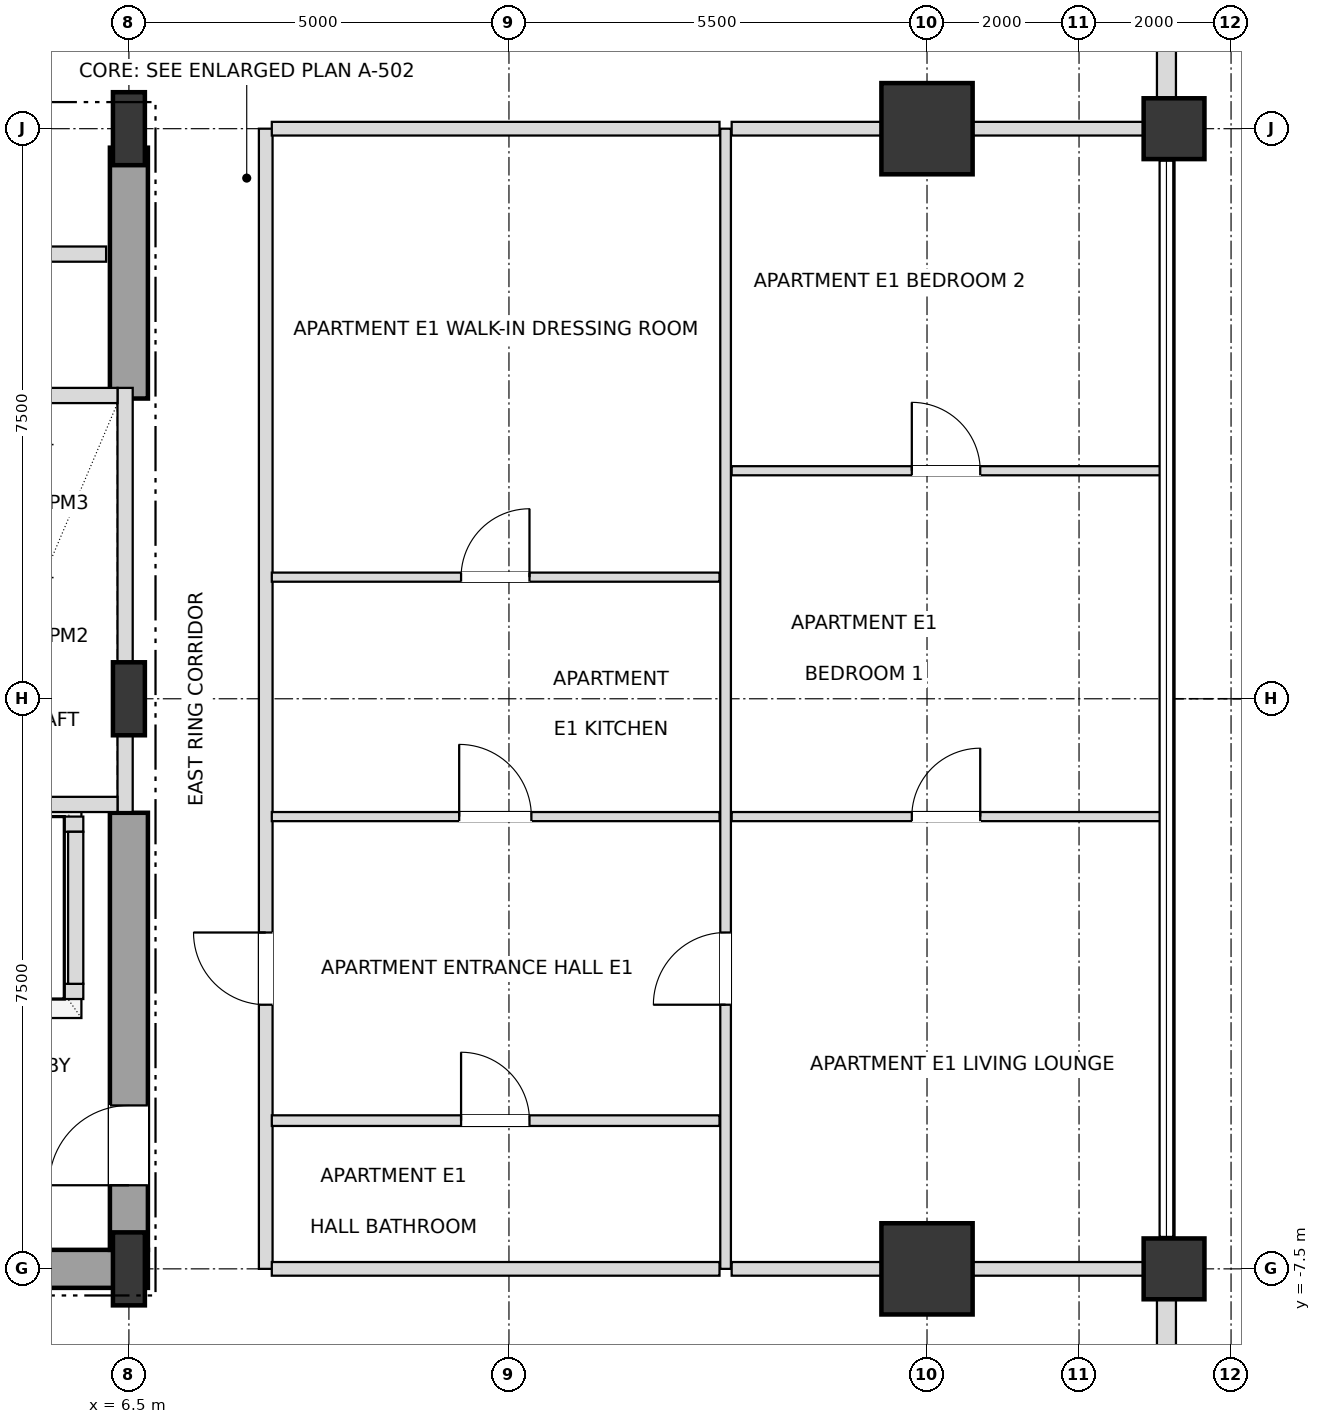
"""IFC4 building model, lengths in metres.
Left out: names, types, materials, properties, quantities, classifications, styles, units other than length and angle.
Written with IfcOpenShell. Run it as: python <this file> out.ifc"""

import sys

from ifc_helpers import new_model, si_unit, direction, frame, frame_2d, origin, origin_2d, place, context, subcontext, project, spatial, rectangle, i_section, extrude, element, fill, save


model = new_model("IFC4")
c1 = context("Model", 3, precision=1e-05, world=origin(), true_north=direction((0.0, 1.0)))
c2 = subcontext(c1, "Body", "Model", "MODEL_VIEW")
j1 = project(units=[si_unit("LENGTHUNIT", "METRE"), si_unit("PLANEANGLEUNIT", "RADIAN")], contexts=[c1])
p1 = place(None, origin())
s1 = spatial("IfcSite", under=j1, at=p1, CompositionType="ELEMENT")
p2 = place(p1, origin())
s2 = spatial("IfcBuilding", under=s1, at=p2, CompositionType="ELEMENT")
p3 = place(p2, frame((0.0, 0.0, 99.0)))
s3 = spatial("IfcBuildingStorey", under=s2, at=p3, CompositionType="ELEMENT", Elevation=99.0)
for number, where, z_axis, x_axis in (
    (1, (6.5, -7.5, 0.0), (0.0, 0.0, 1.0), (1.0, 0.0, 0.0)),
    (2, (6.5, 0.0, 0.0), (0.0, 0.0, 1.0), (1.0, 0.0, 0.0)),
    (3, (6.5, 7.5, 0.0), (0.0, 0.0, 1.0), (1.0, 0.0, 0.0)),
):
    element("IfcColumn", number, at=place(p3, frame(where, z_axis=z_axis, x_axis=x_axis)), inside=s3, PredefinedType="COLUMN", context=c2, shape_type="SweptSolid", body=[
        extrude(i_section(OverallWidth=0.42, OverallDepth=0.96, WebThickness=0.022, FlangeThickness=0.034, at=origin_2d()), origin(), (0.0, 0.0, 1.0), 3.6),
    ])
for number, where, z_axis, x_axis in (
    (4, (17.0, -7.5, 0.0), (0.0, 0.0, 1.0), (1.0, 0.0, 0.0)),
    (5, (17.0, 7.5, 0.0), (0.0, 0.0, 1.0), (1.0, 0.0, 0.0)),
):
    element("IfcColumn", number, at=place(p3, frame(where, z_axis=z_axis, x_axis=x_axis)), inside=s3, PredefinedType="USERDEFINED", context=c2, shape_type="SweptSolid", body=[
        extrude(rectangle(XDim=1.2, YDim=1.2, at=origin_2d()), origin(), (0.0, 0.0, 1.0), 3.6),
    ])
for number, where, z_axis, x_axis in (
    (6, (20.25, -7.5, 0.0), (0.0, 0.0, 1.0), (1.0, 0.0, 0.0)),
    (7, (20.25, 7.5, 0.0), (0.0, 0.0, 1.0), (1.0, 0.0, 0.0)),
):
    element("IfcColumn", number, at=place(p3, frame(where, z_axis=z_axis, x_axis=x_axis)), inside=s3, PredefinedType="COLUMN", context=c2, shape_type="SweptSolid", body=[
        extrude(rectangle(XDim=0.8, YDim=0.8, at=origin_2d()), origin(), (0.0, 0.0, 1.0), 3.6),
    ])
p4 = place(p3, frame((20.15, -12.605, 0.0), z_axis=(0.0, 0.0, 1.0), x_axis=(0.0, 1.0, 0.0)))
e8 = element("IfcWall", 8, at=p4, inside=s3, PredefinedType="SOLIDWALL", context=c2, shape_type="SweptSolid", body=[
    extrude(rectangle(XDim=4.71, YDim=0.25, at=frame_2d((2.355, 0.0))), origin(), (0.0, 0.0, 1.0), 2.736),
])
p5 = place(p4, frame((1.455, 0.0, 0.72)))
e9 = element("IfcOpeningElement", 9, at=p5, cuts=e8, PredefinedType="OPENING", context=c2, shape_type="SweptSolid", body=[
    extrude(rectangle(XDim=1.8, YDim=1.68, at=frame_2d((0.9, 0.84))), frame((0.0, 0.135, 0.0), z_axis=(0.0, -1.0, 0.0), x_axis=(1.0, 0.0, 0.0)), (0.0, 0.0, 1.0), 0.27),
])
p6 = place(p3, frame((20.15, 7.895, 0.0), z_axis=(0.0, 0.0, 1.0), x_axis=(0.0, 1.0, 0.0)))
e10 = element("IfcWall", 10, at=p6, inside=s3, PredefinedType="SOLIDWALL", context=c2, shape_type="SweptSolid", body=[
    extrude(rectangle(XDim=4.71, YDim=0.25, at=frame_2d((2.355, 0.0))), origin(), (0.0, 0.0, 1.0), 2.736),
])
p7 = place(p6, frame((1.455, 0.0, 0.72)))
e11 = element("IfcOpeningElement", 11, at=p7, cuts=e10, PredefinedType="OPENING", context=c2, shape_type="SweptSolid", body=[
    extrude(rectangle(XDim=1.8, YDim=1.68, at=frame_2d((0.9, 0.84))), frame((0.0, 0.135, 0.0), z_axis=(0.0, -1.0, 0.0), x_axis=(1.0, 0.0, 0.0)), (0.0, 0.0, 1.0), 0.27),
])
p8 = place(p3, frame((0.0, -7.5, 0.0), z_axis=(0.0, 0.0, 1.0), x_axis=(1.0, 0.0, 0.0)))
e12 = element("IfcWall", 12, at=p8, inside=s3, PredefinedType="SHEAR", context=c2, shape_type="SweptSolid", body=[
    extrude(rectangle(XDim=6.75, YDim=0.5, at=frame_2d((3.375, 0.0))), origin(), (0.0, 0.0, 1.0), 3.38),
])
p9 = place(p3, frame((6.5, -7.25, 0.0), z_axis=(0.0, 0.0, 1.0), x_axis=(0.0, 1.0, 0.0)))
e13 = element("IfcWall", 13, at=p9, inside=s3, PredefinedType="SHEAR", context=c2, shape_type="SweptSolid", body=[
    extrude(rectangle(XDim=5.75, YDim=0.5, at=frame_2d((2.875, 0.0))), origin(), (0.0, 0.0, 1.0), 3.38),
])
p10 = place(p9, frame((0.85, 0.0, 0.0)))
e14 = element("IfcOpeningElement", 14, at=p10, cuts=e13, PredefinedType="OPENING", context=c2, shape_type="SweptSolid", body=[
    extrude(rectangle(XDim=1.05, YDim=2.15, at=frame_2d((0.525, 1.075))), frame((0.0, 0.26, 0.0), z_axis=(0.0, -1.0, 0.0), x_axis=(1.0, 0.0, 0.0)), (0.0, 0.0, 1.0), 0.52),
])
p11 = place(p3, frame((6.5, 3.95, 0.0), z_axis=(0.0, 0.0, 1.0), x_axis=(0.0, 1.0, 0.0)))
e15 = element("IfcWall", 15, at=p11, inside=s3, PredefinedType="SHEAR", context=c2, shape_type="SweptSolid", body=[
    extrude(rectangle(XDim=3.3, YDim=0.5, at=frame_2d((1.65, 0.0))), origin(), (0.0, 0.0, 1.0), 3.38),
])
p12 = place(p3, frame((6.45, -1.49, 0.0), z_axis=(0.0, 0.0, 1.0), x_axis=(0.0, 1.0, 0.0)))
e16 = element("IfcWall", 16, at=p12, inside=s3, PredefinedType="SOLIDWALL", context=c2, shape_type="SweptSolid", body=[
    extrude(rectangle(XDim=5.58, YDim=0.2, at=frame_2d((2.79, 0.0))), origin(), (0.0, 0.0, 1.0), 2.816),
])
for number, where, z_axis, x_axis in (
    (17, (4.15, -1.39, 0.0), (0.0, 0.0, 1.0), (1.0, 0.0, 0.0)),
    (18, (4.15, 3.99, 0.0), (0.0, 0.0, 1.0), (1.0, 0.0, 0.0)),
):
    element("IfcWall", number, at=place(p3, frame(where, z_axis=z_axis, x_axis=x_axis)), inside=s3, PredefinedType="SOLIDWALL", context=c2, shape_type="SweptSolid", body=[
        extrude(rectangle(XDim=2.2, YDim=0.2, at=frame_2d((1.1, 0.0))), origin(), (0.0, 0.0, 1.0), 3.38),
    ])
p13 = place(p3, frame((1.8, -3.85, 0.0), z_axis=(0.0, 0.0, 1.0), x_axis=(1.0, 0.0, 0.0)))
e19 = element("IfcWall", 19, at=p13, inside=s3, PredefinedType="SOLIDWALL", context=c2, shape_type="SweptSolid", body=[
    extrude(rectangle(XDim=4.1, YDim=0.2, at=frame_2d((2.05, 0.0))), origin(), (0.0, 0.0, 1.0), 3.38),
])
p14 = place(p13, frame((0.45, 0.0, 0.0)))
e20 = element("IfcOpeningElement", 20, at=p14, cuts=e19, PredefinedType="OPENING", context=c2, shape_type="SweptSolid", body=[
    extrude(rectangle(XDim=1.2, YDim=2.2, at=frame_2d((0.6, 1.1))), frame((0.0, 0.11, 0.0), z_axis=(0.0, -1.0, 0.0), x_axis=(1.0, 0.0, 0.0)), (0.0, 0.0, 1.0), 0.22),
])
p15 = place(p13, frame((2.45, 0.0, 0.0)))
e21 = element("IfcOpeningElement", 21, at=p15, cuts=e19, PredefinedType="OPENING", context=c2, shape_type="SweptSolid", body=[
    extrude(rectangle(XDim=1.2, YDim=2.2, at=frame_2d((0.6, 1.1))), frame((0.0, 0.11, 0.0), z_axis=(0.0, -1.0, 0.0), x_axis=(1.0, 0.0, 0.0)), (0.0, 0.0, 1.0), 0.22),
])
p16 = place(p3, frame((1.8, -1.65, 0.0), z_axis=(0.0, 0.0, 1.0), x_axis=(1.0, 0.0, 0.0)))
e22 = element("IfcWall", 22, at=p16, inside=s3, PredefinedType="SOLIDWALL", context=c2, shape_type="SweptSolid", body=[
    extrude(rectangle(XDim=4.1, YDim=0.2, at=frame_2d((2.05, 0.0))), origin(), (0.0, 0.0, 1.0), 3.38),
])
p17 = place(p3, frame((5.8, -3.75, 0.0), z_axis=(0.0, 0.0, 1.0), x_axis=(0.0, 1.0, 0.0)))
e23 = element("IfcWall", 23, at=p17, inside=s3, PredefinedType="SOLIDWALL", context=c2, shape_type="SweptSolid", body=[
    extrude(rectangle(XDim=2.0, YDim=0.2, at=frame_2d((1.0, 0.0))), origin(), (0.0, 0.0, 1.0), 3.38),
])
p18 = place(p3, frame((8.3, -7.5, 0.0), z_axis=(0.0, 0.0, 1.0), x_axis=(0.0, 1.0, 0.0)))
e24 = element("IfcWall", 24, at=p18, inside=s3, PredefinedType="PARTITIONING", context=c2, shape_type="SweptSolid", body=[
    extrude(rectangle(XDim=15.0, YDim=0.18, at=frame_2d((7.5, 0.0))), origin(), (0.0, 0.0, 1.0), 3.38),
])
p19 = place(p18, frame((3.475, 0.0, 0.0)))
e25 = element("IfcOpeningElement", 25, at=p19, cuts=e24, PredefinedType="OPENING", context=c2, shape_type="SweptSolid", body=[
    extrude(rectangle(XDim=0.95, YDim=2.15, at=frame_2d((0.475, 1.075))), frame((0.0, 0.1, 0.0), z_axis=(0.0, -1.0, 0.0), x_axis=(1.0, 0.0, 0.0)), (0.0, 0.0, 1.0), 0.2),
])
p20 = place(p3, frame((14.35, -7.5, 0.0), z_axis=(0.0, 0.0, 1.0), x_axis=(0.0, 1.0, 0.0)))
e26 = element("IfcWall", 26, at=p20, inside=s3, PredefinedType="PARTITIONING", context=c2, shape_type="SweptSolid", body=[
    extrude(rectangle(XDim=15.0, YDim=0.14, at=frame_2d((7.5, 0.0))), origin(), (0.0, 0.0, 1.0), 3.38),
])
p21 = place(p20, frame((3.475, 0.0, 0.0)))
e27 = element("IfcOpeningElement", 27, at=p21, cuts=e26, PredefinedType="OPENING", context=c2, shape_type="SweptSolid", body=[
    extrude(rectangle(XDim=0.95, YDim=2.1, at=frame_2d((0.475, 1.05))), frame((0.0, 0.08, 0.0), z_axis=(0.0, -1.0, 0.0), x_axis=(1.0, 0.0, 0.0)), (0.0, 0.0, 1.0), 0.16),
])
p22 = place(p3, frame((8.38, -7.5, 0.0), z_axis=(0.0, 0.0, 1.0), x_axis=(1.0, 0.0, 0.0)))
e28 = element("IfcWall", 28, at=p22, inside=s3, PredefinedType="PARTITIONING", context=c2, shape_type="SweptSolid", body=[
    extrude(rectangle(XDim=5.89, YDim=0.18, at=frame_2d((2.945, 0.0))), origin(), (0.0, 0.0, 1.0), 2.816),
])
p23 = place(p3, frame((14.43, -7.5, 0.0), z_axis=(0.0, 0.0, 1.0), x_axis=(1.0, 0.0, 0.0)))
e29 = element("IfcWall", 29, at=p23, inside=s3, PredefinedType="PARTITIONING", context=c2, shape_type="SweptSolid", body=[
    extrude(rectangle(XDim=5.72, YDim=0.18, at=frame_2d((2.86, 0.0))), origin(), (0.0, 0.0, 1.0), 2.816),
])
p24 = place(p3, frame((8.38, -5.55, 0.0), z_axis=(0.0, 0.0, 1.0), x_axis=(1.0, 0.0, 0.0)))
e30 = element("IfcWall", 30, at=p24, inside=s3, PredefinedType="PARTITIONING", context=c2, shape_type="SweptSolid", body=[
    extrude(rectangle(XDim=5.89, YDim=0.14, at=frame_2d((2.945, 0.0))), origin(), (0.0, 0.0, 1.0), 3.38),
])
p25 = place(p24, frame((2.49, 0.0, 0.0)))
e31 = element("IfcOpeningElement", 31, at=p25, cuts=e30, PredefinedType="OPENING", context=c2, shape_type="SweptSolid", body=[
    extrude(rectangle(XDim=0.9, YDim=2.1, at=frame_2d((0.45, 1.05))), frame((0.0, 0.08, 0.0), z_axis=(0.0, -1.0, 0.0), x_axis=(1.0, 0.0, 0.0)), (0.0, 0.0, 1.0), 0.16),
])
p26 = place(p3, frame((8.38, -1.55, 0.0), z_axis=(0.0, 0.0, 1.0), x_axis=(1.0, 0.0, 0.0)))
e32 = element("IfcWall", 32, at=p26, inside=s3, PredefinedType="PARTITIONING", context=c2, shape_type="SweptSolid", body=[
    extrude(rectangle(XDim=5.89, YDim=0.12, at=frame_2d((2.945, 0.0))), origin(), (0.0, 0.0, 1.0), 3.38),
])
p27 = place(p26, frame((2.465, 0.0, 0.0)))
e33 = element("IfcOpeningElement", 33, at=p27, cuts=e32, PredefinedType="OPENING", context=c2, shape_type="SweptSolid", body=[
    extrude(rectangle(XDim=0.95, YDim=2.1, at=frame_2d((0.475, 1.05))), frame((0.0, 0.07, 0.0), z_axis=(0.0, -1.0, 0.0), x_axis=(1.0, 0.0, 0.0)), (0.0, 0.0, 1.0), 0.14),
])
p28 = place(p3, frame((14.43, -1.55, 0.0), z_axis=(0.0, 0.0, 1.0), x_axis=(1.0, 0.0, 0.0)))
e34 = element("IfcWall", 34, at=p28, inside=s3, PredefinedType="PARTITIONING", context=c2, shape_type="SweptSolid", body=[
    extrude(rectangle(XDim=5.64, YDim=0.12, at=frame_2d((2.82, 0.0))), origin(), (0.0, 0.0, 1.0), 2.816),
])
p29 = place(p28, frame((2.37, 0.0, 0.0)))
e35 = element("IfcOpeningElement", 35, at=p29, cuts=e34, PredefinedType="OPENING", context=c2, shape_type="SweptSolid", body=[
    extrude(rectangle(XDim=0.9, YDim=2.1, at=frame_2d((0.45, 1.05))), frame((0.0, 0.07, 0.0), z_axis=(0.0, -1.0, 0.0), x_axis=(1.0, 0.0, 0.0)), (0.0, 0.0, 1.0), 0.14),
])
p30 = place(p3, frame((8.38, 1.6, 0.0), z_axis=(0.0, 0.0, 1.0), x_axis=(1.0, 0.0, 0.0)))
e36 = element("IfcWall", 36, at=p30, inside=s3, PredefinedType="PARTITIONING", context=c2, shape_type="SweptSolid", body=[
    extrude(rectangle(XDim=5.89, YDim=0.12, at=frame_2d((2.945, 0.0))), origin(), (0.0, 0.0, 1.0), 3.38),
])
p31 = place(p30, frame((2.49, 0.0, 0.0)))
e37 = element("IfcOpeningElement", 37, at=p31, cuts=e36, PredefinedType="OPENING", context=c2, shape_type="SweptSolid", body=[
    extrude(rectangle(XDim=0.9, YDim=2.1, at=frame_2d((0.45, 1.05))), frame((0.0, 0.07, 0.0), z_axis=(0.0, -1.0, 0.0), x_axis=(1.0, 0.0, 0.0)), (0.0, 0.0, 1.0), 0.14),
])
p32 = place(p3, frame((14.43, 3.0, 0.0), z_axis=(0.0, 0.0, 1.0), x_axis=(1.0, 0.0, 0.0)))
e38 = element("IfcWall", 38, at=p32, inside=s3, PredefinedType="PARTITIONING", context=c2, shape_type="SweptSolid", body=[
    extrude(rectangle(XDim=5.64, YDim=0.12, at=frame_2d((2.82, 0.0))), origin(), (0.0, 0.0, 1.0), 2.816),
])
p33 = place(p32, frame((2.37, 0.0, 0.0)))
e39 = element("IfcOpeningElement", 39, at=p33, cuts=e38, PredefinedType="OPENING", context=c2, shape_type="SweptSolid", body=[
    extrude(rectangle(XDim=0.9, YDim=2.1, at=frame_2d((0.45, 1.05))), frame((0.0, 0.07, 0.0), z_axis=(0.0, -1.0, 0.0), x_axis=(1.0, 0.0, 0.0)), (0.0, 0.0, 1.0), 0.14),
])
p34 = place(p3, frame((4.13, 5.85, 0.0), z_axis=(0.0, 0.0, 1.0), x_axis=(1.0, 0.0, 0.0)))
e40 = element("IfcWall", 40, at=p34, inside=s3, PredefinedType="SOLIDWALL", context=c2, shape_type="SweptSolid", body=[
    extrude(rectangle(XDim=2.07, YDim=0.2, at=frame_2d((1.035, 0.0))), origin(), (0.0, 0.0, 1.0), 3.38),
])
p35 = place(p3, frame((8.38, 7.5, 0.0), z_axis=(0.0, 0.0, 1.0), x_axis=(1.0, 0.0, 0.0)))
e41 = element("IfcWall", 41, at=p35, inside=s3, PredefinedType="PARTITIONING", context=c2, shape_type="SweptSolid", body=[
    extrude(rectangle(XDim=5.89, YDim=0.18, at=frame_2d((2.945, 0.0))), origin(), (0.0, 0.0, 1.0), 2.816),
])
p36 = place(p3, frame((14.43, 7.5, 0.0), z_axis=(0.0, 0.0, 1.0), x_axis=(1.0, 0.0, 0.0)))
e42 = element("IfcWall", 42, at=p36, inside=s3, PredefinedType="PARTITIONING", context=c2, shape_type="SweptSolid", body=[
    extrude(rectangle(XDim=5.72, YDim=0.18, at=frame_2d((2.86, 0.0))), origin(), (0.0, 0.0, 1.0), 2.816),
])
p37 = place(p10, origin())
e43 = element("IfcDoor", 43, at=p37, inside=s3, OperationType="SINGLE_SWING_LEFT", PredefinedType="DOOR", context=c2, shape_type="SweptSolid", body=[
    extrude(rectangle(XDim=1.05, YDim=2.15, at=frame_2d((0.525, 1.075))), frame((0.0, 0.025, 0.0), z_axis=(0.0, -1.0, 0.0), x_axis=(1.0, 0.0, 0.0)), (0.0, 0.0, 1.0), 0.05),
])
fill(e14, e43)
p38 = place(p25, origin())
e44 = element("IfcDoor", 44, at=p38, inside=s3, OperationType="SINGLE_SWING_LEFT", PredefinedType="DOOR", context=c2, shape_type="SweptSolid", body=[
    extrude(rectangle(XDim=0.9, YDim=2.1, at=frame_2d((0.45, 1.05))), frame((0.0, 0.025, 0.0), z_axis=(0.0, -1.0, 0.0), x_axis=(1.0, 0.0, 0.0)), (0.0, 0.0, 1.0), 0.05),
])
fill(e31, e44)
p39 = place(p19, origin())
e45 = element("IfcDoor", 45, at=p39, inside=s3, OperationType="SINGLE_SWING_RIGHT", PredefinedType="DOOR", context=c2, shape_type="SweptSolid", body=[
    extrude(rectangle(XDim=0.95, YDim=2.15, at=frame_2d((0.475, 1.075))), frame((0.0, 0.025, 0.0), z_axis=(0.0, -1.0, 0.0), x_axis=(1.0, 0.0, 0.0)), (0.0, 0.0, 1.0), 0.05),
])
fill(e25, e45)
p40 = place(p27, origin())
e46 = element("IfcDoor", 46, at=p40, inside=s3, OperationType="SINGLE_SWING_LEFT", PredefinedType="DOOR", context=c2, shape_type="SweptSolid", body=[
    extrude(rectangle(XDim=0.95, YDim=2.1, at=frame_2d((0.475, 1.05))), frame((0.0, 0.025, 0.0), z_axis=(0.0, -1.0, 0.0), x_axis=(1.0, 0.0, 0.0)), (0.0, 0.0, 1.0), 0.05),
])
fill(e33, e46)
p41 = place(p31, origin())
e47 = element("IfcDoor", 47, at=p41, inside=s3, OperationType="SINGLE_SWING_RIGHT", PredefinedType="DOOR", context=c2, shape_type="SweptSolid", body=[
    extrude(rectangle(XDim=0.9, YDim=2.1, at=frame_2d((0.45, 1.05))), frame((0.0, 0.025, 0.0), z_axis=(0.0, -1.0, 0.0), x_axis=(1.0, 0.0, 0.0)), (0.0, 0.0, 1.0), 0.05),
])
fill(e37, e47)
p42 = place(p21, origin())
e48 = element("IfcDoor", 48, at=p42, inside=s3, OperationType="SINGLE_SWING_LEFT", PredefinedType="DOOR", context=c2, shape_type="SweptSolid", body=[
    extrude(rectangle(XDim=0.95, YDim=2.1, at=frame_2d((0.475, 1.05))), frame((0.0, 0.025, 0.0), z_axis=(0.0, -1.0, 0.0), x_axis=(1.0, 0.0, 0.0)), (0.0, 0.0, 1.0), 0.05),
])
fill(e27, e48)
p43 = place(p29, origin())
e49 = element("IfcDoor", 49, at=p43, inside=s3, OperationType="SINGLE_SWING_RIGHT", PredefinedType="DOOR", context=c2, shape_type="SweptSolid", body=[
    extrude(rectangle(XDim=0.9, YDim=2.1, at=frame_2d((0.45, 1.05))), frame((0.0, 0.025, 0.0), z_axis=(0.0, -1.0, 0.0), x_axis=(1.0, 0.0, 0.0)), (0.0, 0.0, 1.0), 0.05),
])
fill(e35, e49)
p44 = place(p33, origin())
e50 = element("IfcDoor", 50, at=p44, inside=s3, OperationType="SINGLE_SWING_LEFT", PredefinedType="DOOR", context=c2, shape_type="SweptSolid", body=[
    extrude(rectangle(XDim=0.9, YDim=2.1, at=frame_2d((0.45, 1.05))), frame((0.0, 0.025, 0.0), z_axis=(0.0, -1.0, 0.0), x_axis=(1.0, 0.0, 0.0)), (0.0, 0.0, 1.0), 0.05),
])
fill(e39, e50)
save(model, sys.argv[1])
